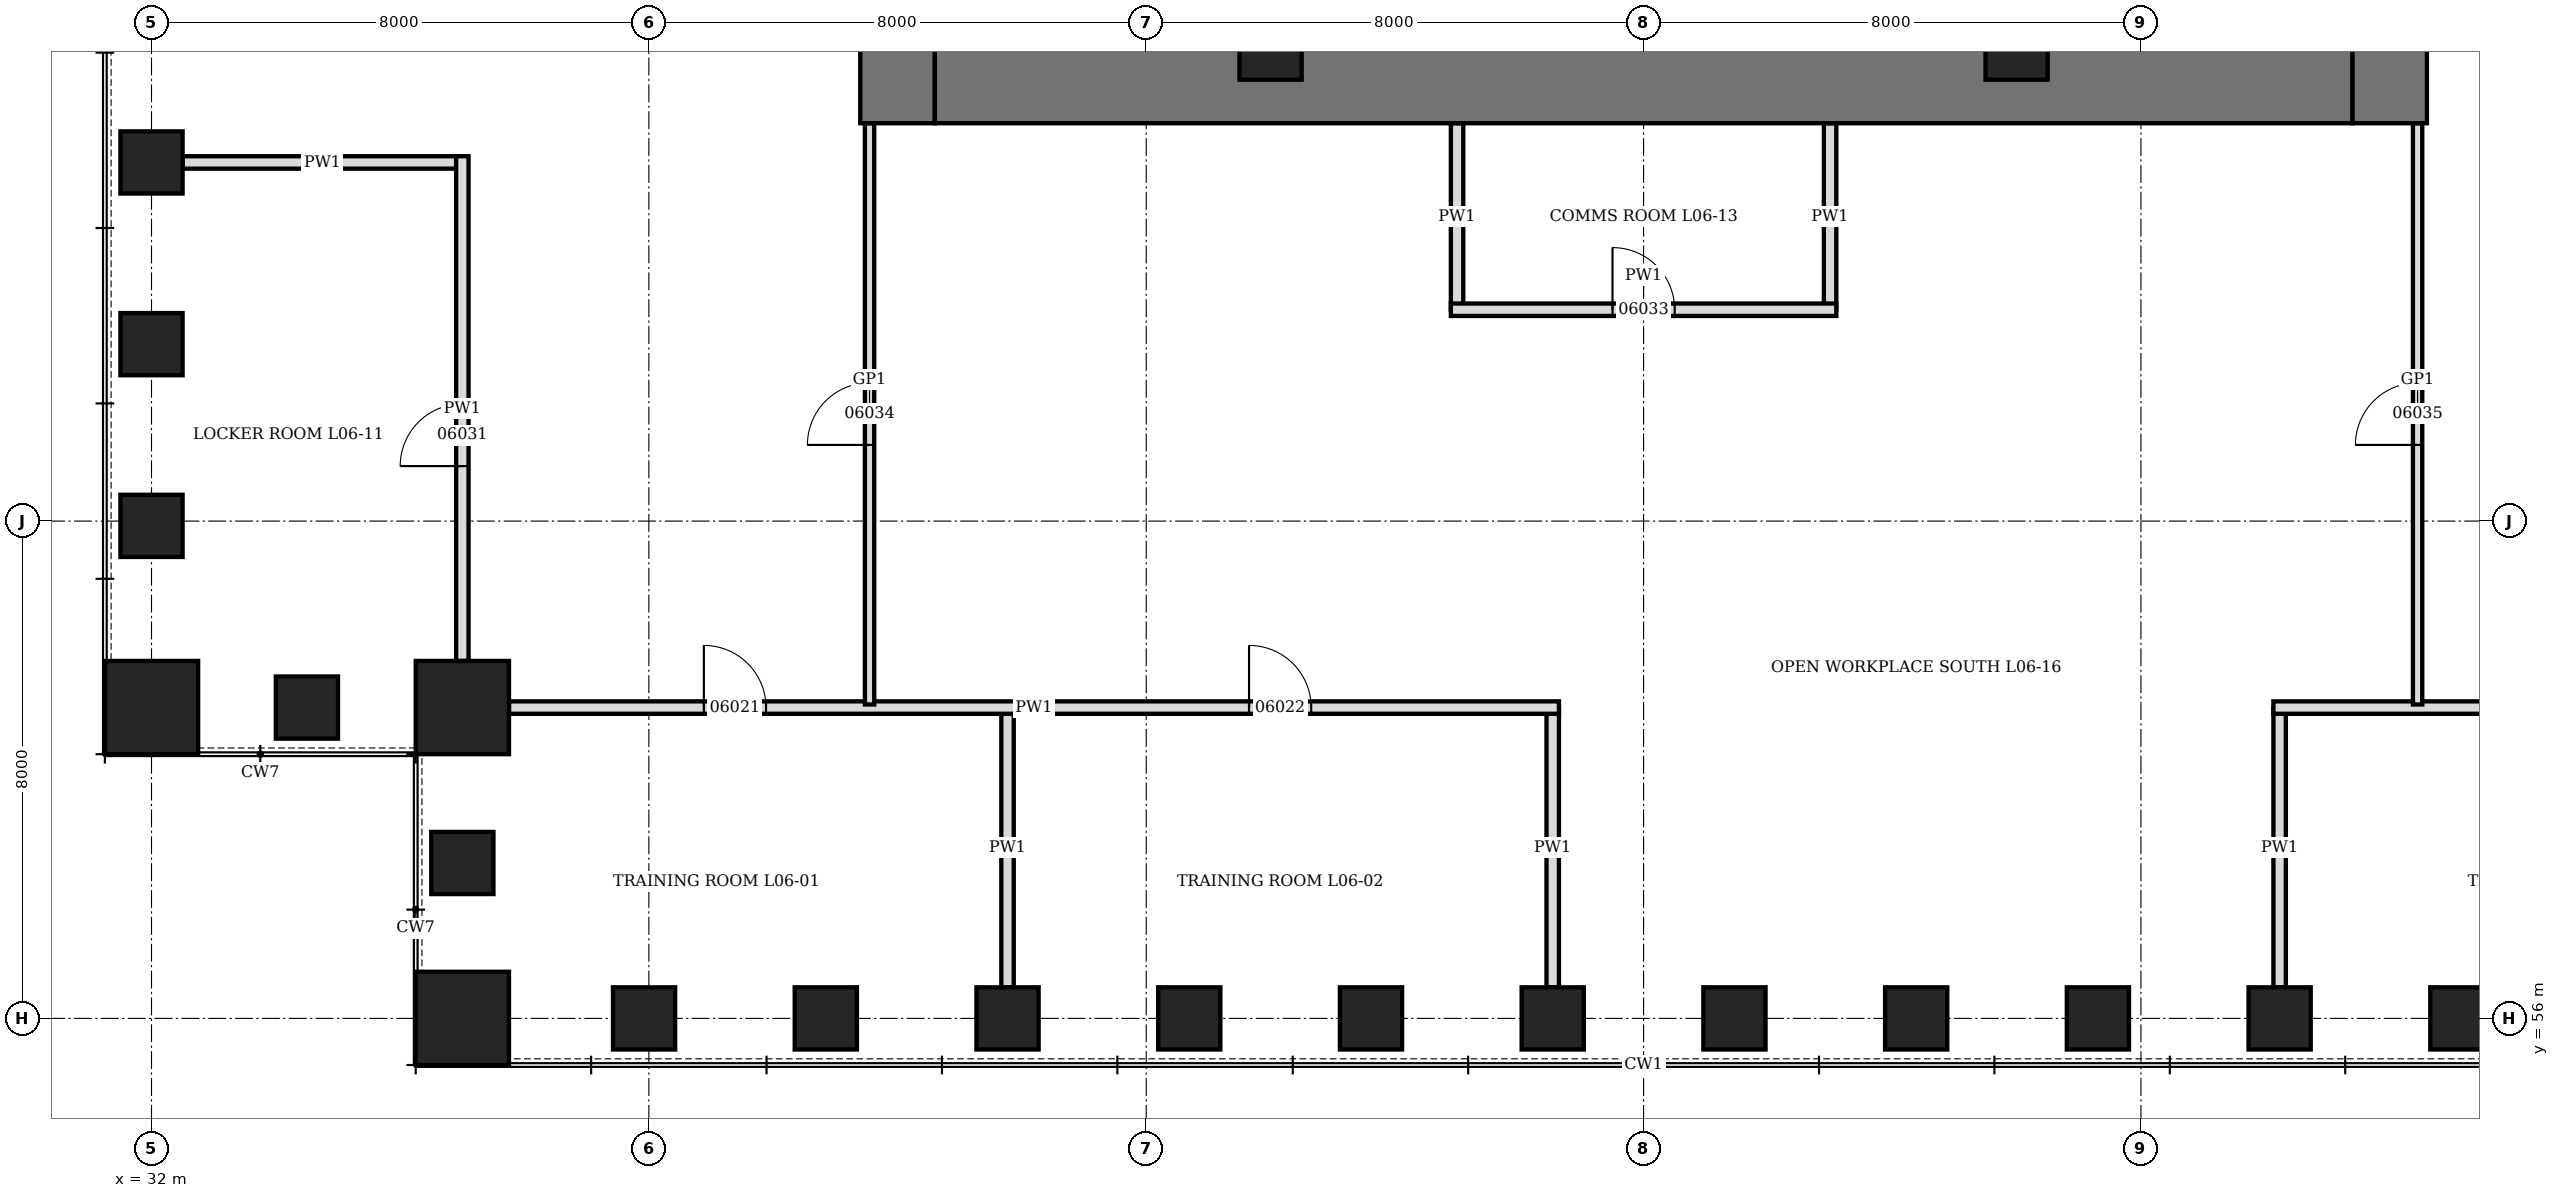
"""IFC4 building model, lengths in metres.
Left out: names, types, materials, properties, quantities, classifications, styles, units other than length and angle.
Written with IfcOpenShell. Run it as: python <this file> out.ifc"""

import sys

from ifc_helpers import new_model, si_unit, direction, frame, frame_2d, origin, origin_2d, place, context, subcontext, project, spatial, rectangle, hollow_rectangle, extrude, element, fill, save


model = new_model("IFC4")
c1 = context("Model", 3, precision=1e-05, world=origin(), true_north=direction((0.0, 1.0)))
c2 = subcontext(c1, "Body", "Model", "MODEL_VIEW")
j1 = project(units=[si_unit("LENGTHUNIT", "METRE"), si_unit("PLANEANGLEUNIT", "RADIAN")], contexts=[c1])
p1 = place(None, origin())
s1 = spatial("IfcSite", under=j1, at=p1, CompositionType="ELEMENT")
p2 = place(p1, origin())
s2 = spatial("IfcBuilding", under=s1, at=p2, CompositionType="ELEMENT")
p3 = place(p2, frame((0.0, 0.0, 34.9)))
s3 = spatial("IfcBuildingStorey", under=s2, at=p3, CompositionType="ELEMENT", Elevation=34.9)
p4 = place(p3, frame((37.0, 56.0, -0.3), z_axis=(0.0, 0.0, 1.0), x_axis=(1.0, 0.0, 0.0)))
e1 = element("IfcColumn", 1, at=p4, inside=s3, PredefinedType="COLUMN", context=c2, shape_type="SweptSolid", body=[
    extrude(hollow_rectangle(XDim=1.5, YDim=1.5, WallThickness=0.6, at=origin_2d()), origin(), (0.0, 0.0, 1.0), 4.5),
])
for number, where, z_axis, x_axis in (
    (2, (39.923, 56.0, -0.3), (0.0, 0.0, 1.0), (1.0, 0.0, 0.0)),
    (3, (42.846, 56.0, -0.3), (0.0, 0.0, 1.0), (1.0, 0.0, 0.0)),
    (4, (45.769, 56.0, -0.3), (0.0, 0.0, 1.0), (1.0, 0.0, 0.0)),
    (5, (48.692, 56.0, -0.3), (0.0, 0.0, 1.0), (1.0, 0.0, 0.0)),
    (6, (51.615, 56.0, -0.3), (0.0, 0.0, 1.0), (1.0, 0.0, 0.0)),
    (7, (54.539, 56.0, -0.3), (0.0, 0.0, 1.0), (1.0, 0.0, 0.0)),
    (8, (57.461, 56.0, -0.3), (0.0, 0.0, 1.0), (1.0, 0.0, 0.0)),
    (9, (60.385, 56.0, -0.3), (0.0, 0.0, 1.0), (1.0, 0.0, 0.0)),
    (10, (63.308, 56.0, -0.3), (0.0, 0.0, 1.0), (1.0, 0.0, 0.0)),
    (11, (66.231, 56.0, -0.3), (0.0, 0.0, 1.0), (1.0, 0.0, 0.0)),
    (12, (69.154, 56.0, -0.3), (0.0, 0.0, 1.0), (1.0, 0.0, 0.0)),
    (13, (32.0, 69.769, -0.3), (0.0, 0.0, 1.0), (0.0, 1.0, 0.0)),
    (14, (32.0, 66.846, -0.3), (0.0, 0.0, 1.0), (0.0, 1.0, 0.0)),
    (15, (32.0, 63.923, -0.3), (0.0, 0.0, 1.0), (0.0, 1.0, 0.0)),
):
    element("IfcColumn", number, at=place(p3, frame(where, z_axis=z_axis, x_axis=x_axis)), inside=s3, PredefinedType="COLUMN", context=c2, shape_type="SweptSolid", body=[
        extrude(hollow_rectangle(XDim=1.0, YDim=1.0, WallThickness=0.25, at=origin_2d()), origin(), (0.0, 0.0, 1.0), 4.5),
    ])
p5 = place(p3, frame((32.0, 61.0, -0.3), z_axis=(0.0, 0.0, 1.0), x_axis=(1.0, 0.0, 0.0)))
e16 = element("IfcColumn", 16, at=p5, inside=s3, PredefinedType="COLUMN", context=c2, shape_type="SweptSolid", body=[
    extrude(hollow_rectangle(XDim=1.5, YDim=1.5, WallThickness=0.6, at=origin_2d()), origin(), (0.0, 0.0, 1.0), 4.5),
])
p6 = place(p3, frame((34.5, 61.0, -0.3), z_axis=(0.0, 0.0, 1.0), x_axis=(1.0, 0.0, 0.0)))
e17 = element("IfcColumn", 17, at=p6, inside=s3, PredefinedType="COLUMN", context=c2, shape_type="SweptSolid", body=[
    extrude(hollow_rectangle(XDim=1.0, YDim=1.0, WallThickness=0.25, at=origin_2d()), origin(), (0.0, 0.0, 1.0), 4.5),
])
p7 = place(p3, frame((37.0, 61.0, -0.3), z_axis=(0.0, 0.0, 1.0), x_axis=(0.0, 1.0, 0.0)))
e18 = element("IfcColumn", 18, at=p7, inside=s3, PredefinedType="COLUMN", context=c2, shape_type="SweptSolid", body=[
    extrude(hollow_rectangle(XDim=1.5, YDim=1.5, WallThickness=0.6, at=origin_2d()), origin(), (0.0, 0.0, 1.0), 4.5),
])
p8 = place(p3, frame((37.0, 58.5, -0.3), z_axis=(0.0, 0.0, 1.0), x_axis=(0.0, 1.0, 0.0)))
e19 = element("IfcColumn", 19, at=p8, inside=s3, PredefinedType="COLUMN", context=c2, shape_type="SweptSolid", body=[
    extrude(hollow_rectangle(XDim=1.0, YDim=1.0, WallThickness=0.25, at=origin_2d()), origin(), (0.0, 0.0, 1.0), 4.5),
])
p9 = place(p3, frame((44.0, 70.4, 0.0), z_axis=(0.0, 0.0, 1.0), x_axis=(0.0, 1.0, 0.0)))
e20 = element("IfcWall", 20, at=p9, inside=s3, PredefinedType="SHEAR", context=c2, shape_type="SweptSolid", body=[
    extrude(rectangle(XDim=19.2, YDim=1.2, at=frame_2d((9.6, 0.0))), origin(), (0.0, 0.0, 1.0), 4.2),
])
p10 = place(p9, frame((8.6, 0.0, 0.0)))
e21 = element("IfcOpeningElement", 21, at=p10, cuts=e20, PredefinedType="OPENING", context=c2, shape_type="SweptSolid", body=[
    extrude(rectangle(XDim=2.0, YDim=2.4, at=frame_2d((1.0, 1.2))), frame((0.0, 0.61, 0.0), z_axis=(0.0, -1.0, 0.0), x_axis=(1.0, 0.0, 0.0)), (0.0, 0.0, 1.0), 1.22),
])
p11 = place(p3, frame((68.0, 70.4, 0.0), z_axis=(0.0, 0.0, 1.0), x_axis=(0.0, 1.0, 0.0)))
e22 = element("IfcWall", 22, at=p11, inside=s3, PredefinedType="SHEAR", context=c2, shape_type="SweptSolid", body=[
    extrude(rectangle(XDim=19.2, YDim=1.2, at=frame_2d((9.6, 0.0))), origin(), (0.0, 0.0, 1.0), 4.2),
])
p12 = place(p11, frame((8.6, 0.0, 0.0)))
e23 = element("IfcOpeningElement", 23, at=p12, cuts=e22, PredefinedType="OPENING", context=c2, shape_type="SweptSolid", body=[
    extrude(rectangle(XDim=2.0, YDim=2.4, at=frame_2d((1.0, 1.2))), frame((0.0, 0.61, 0.0), z_axis=(0.0, -1.0, 0.0), x_axis=(1.0, 0.0, 0.0)), (0.0, 0.0, 1.0), 1.22),
])
p13 = place(p3, frame((44.6, 71.0, 0.0), z_axis=(0.0, 0.0, 1.0), x_axis=(1.0, 0.0, 0.0)))
e24 = element("IfcWall", 24, at=p13, inside=s3, PredefinedType="SHEAR", context=c2, shape_type="SweptSolid", body=[
    extrude(rectangle(XDim=22.8, YDim=1.2, at=frame_2d((11.4, 0.0))), origin(), (0.0, 0.0, 1.0), 4.2),
])
for number, where, z_axis, x_axis in (
    (25, (50.0, 71.6, 0.0), (0.0, 0.0, 1.0), (1.0, 0.0, 0.0)),
    (26, (62.0, 71.6, 0.0), (0.0, 0.0, 1.0), (1.0, 0.0, 0.0)),
):
    element("IfcColumn", number, at=place(p3, frame(where, z_axis=z_axis, x_axis=x_axis)), inside=s3, PredefinedType="COLUMN", context=c2, shape_type="SweptSolid", body=[
        extrude(hollow_rectangle(XDim=1.0, YDim=1.0, WallThickness=0.15, at=origin_2d()), origin(), (0.0, 0.0, 1.0), 4.2),
    ])
for number, where, z_axis, x_axis in (
    (27, (45.769, 56.5, 0.0), (0.0, 0.0, 1.0), (0.0, 1.0, 0.0)),
    (28, (54.539, 56.5, 0.0), (0.0, 0.0, 1.0), (0.0, 1.0, 0.0)),
    (29, (66.231, 56.5, 0.0), (0.0, 0.0, 1.0), (0.0, 1.0, 0.0)),
):
    element("IfcWall", number, at=place(p3, frame(where, z_axis=z_axis, x_axis=x_axis)), inside=s3, PredefinedType="PARTITIONING", context=c2, shape_type="SweptSolid", body=[
        extrude(rectangle(XDim=4.5, YDim=0.2, at=frame_2d((2.25, 0.0))), origin(), (0.0, 0.0, 1.0), 3.278),
    ])
p14 = place(p3, frame((32.5, 69.769, 0.0), z_axis=(0.0, 0.0, 1.0), x_axis=(1.0, 0.0, 0.0)))
e30 = element("IfcWall", 30, at=p14, inside=s3, PredefinedType="PARTITIONING", context=c2, shape_type="SweptSolid", body=[
    extrude(rectangle(XDim=4.5, YDim=0.2, at=frame_2d((2.25, 0.0))), origin(), (0.0, 0.0, 1.0), 3.428),
])
for number, where, z_axis, x_axis in (
    (31, (53.0, 67.4, 0.0), (0.0, 0.0, 1.0), (0.0, 1.0, 0.0)),
    (32, (59.0, 67.4, 0.0), (0.0, 0.0, 1.0), (0.0, 1.0, 0.0)),
):
    element("IfcWall", number, at=place(p3, frame(where, z_axis=z_axis, x_axis=x_axis)), inside=s3, PredefinedType="PARTITIONING", context=c2, shape_type="SweptSolid", body=[
        extrude(rectangle(XDim=3.0, YDim=0.2, at=frame_2d((1.5, 0.0))), origin(), (0.0, 0.0, 1.0), 4.04),
    ])
p15 = place(p3, frame((37.75, 61.0, 0.0), z_axis=(0.0, 0.0, 1.0), x_axis=(1.0, 0.0, 0.0)))
e33 = element("IfcWall", 33, at=p15, inside=s3, PredefinedType="PARTITIONING", context=c2, shape_type="SweptSolid", body=[
    extrude(rectangle(XDim=16.888, YDim=0.2, at=frame_2d((8.444, 0.0))), origin(), (0.0, 0.0, 1.0), 4.04),
])
p16 = place(p15, frame((3.135, 0.0, 0.0)))
e34 = element("IfcOpeningElement", 34, at=p16, cuts=e33, PredefinedType="OPENING", context=c2, shape_type="SweptSolid", body=[
    extrude(rectangle(XDim=1.0, YDim=2.1, at=frame_2d((0.5, 1.05))), frame((0.0, 0.11, 0.0), z_axis=(0.0, -1.0, 0.0), x_axis=(1.0, 0.0, 0.0)), (0.0, 0.0, 1.0), 0.22),
])
p17 = place(p15, frame((11.904, 0.0, 0.0)))
e35 = element("IfcOpeningElement", 35, at=p17, cuts=e33, PredefinedType="OPENING", context=c2, shape_type="SweptSolid", body=[
    extrude(rectangle(XDim=1.0, YDim=2.1, at=frame_2d((0.5, 1.05))), frame((0.0, 0.11, 0.0), z_axis=(0.0, -1.0, 0.0), x_axis=(1.0, 0.0, 0.0)), (0.0, 0.0, 1.0), 0.22),
])
p18 = place(p3, frame((66.131, 61.0, 0.0), z_axis=(0.0, 0.0, 1.0), x_axis=(1.0, 0.0, 0.0)))
e36 = element("IfcWall", 36, at=p18, inside=s3, PredefinedType="PARTITIONING", context=c2, shape_type="SweptSolid", body=[
    extrude(rectangle(XDim=8.119, YDim=0.2, at=frame_2d((4.06, 0.0))), origin(), (0.0, 0.0, 1.0), 4.04),
])
p19 = place(p18, frame((3.985, 0.0, 0.0)))
e37 = element("IfcOpeningElement", 37, at=p19, cuts=e36, PredefinedType="OPENING", context=c2, shape_type="SweptSolid", body=[
    extrude(rectangle(XDim=1.0, YDim=2.1, at=frame_2d((0.5, 1.05))), frame((0.0, 0.11, 0.0), z_axis=(0.0, -1.0, 0.0), x_axis=(1.0, 0.0, 0.0)), (0.0, 0.0, 1.0), 0.22),
])
p20 = place(p3, frame((52.9, 67.4, 0.0), z_axis=(0.0, 0.0, 1.0), x_axis=(1.0, 0.0, 0.0)))
e38 = element("IfcWall", 38, at=p20, inside=s3, PredefinedType="PARTITIONING", context=c2, shape_type="SweptSolid", body=[
    extrude(rectangle(XDim=6.2, YDim=0.2, at=frame_2d((3.1, 0.0))), origin(), (0.0, 0.0, 1.0), 4.04),
])
p21 = place(p20, frame((2.6, 0.0, 0.0)))
e39 = element("IfcOpeningElement", 39, at=p21, cuts=e38, PredefinedType="OPENING", context=c2, shape_type="SweptSolid", body=[
    extrude(rectangle(XDim=1.0, YDim=2.1, at=frame_2d((0.5, 1.05))), frame((0.0, 0.11, 0.0), z_axis=(0.0, -1.0, 0.0), x_axis=(1.0, 0.0, 0.0)), (0.0, 0.0, 1.0), 0.22),
])
p22 = place(p3, frame((37.0, 61.75, 0.0), z_axis=(0.0, 0.0, 1.0), x_axis=(0.0, 1.0, 0.0)))
e40 = element("IfcWall", 40, at=p22, inside=s3, PredefinedType="PARTITIONING", context=c2, shape_type="SweptSolid", body=[
    extrude(rectangle(XDim=8.119, YDim=0.2, at=frame_2d((4.06, 0.0))), origin(), (0.0, 0.0, 1.0), 4.04),
])
p23 = place(p22, frame((3.135, 0.0, 0.0)))
e41 = element("IfcOpeningElement", 41, at=p23, cuts=e40, PredefinedType="OPENING", context=c2, shape_type="SweptSolid", body=[
    extrude(rectangle(XDim=1.0, YDim=2.1, at=frame_2d((0.5, 1.05))), frame((0.0, 0.11, 0.0), z_axis=(0.0, -1.0, 0.0), x_axis=(1.0, 0.0, 0.0)), (0.0, 0.0, 1.0), 0.22),
])
p24 = place(p3, frame((43.55, 61.05, 0.0), z_axis=(0.0, 0.0, 1.0), x_axis=(0.0, 1.0, 0.0)))
e42 = element("IfcWall", 42, at=p24, inside=s3, PredefinedType="PARTITIONING", context=c2, shape_type="SweptSolid", body=[
    extrude(rectangle(XDim=9.35, YDim=0.15, at=frame_2d((4.675, 0.0))), origin(), (0.0, 0.0, 1.0), 4.04),
])
p25 = place(p24, frame((4.175, 0.0, 0.0)))
e43 = element("IfcOpeningElement", 43, at=p25, cuts=e42, PredefinedType="OPENING", context=c2, shape_type="SweptSolid", body=[
    extrude(rectangle(XDim=1.0, YDim=2.4, at=frame_2d((0.5, 1.2))), frame((0.0, 0.085, 0.0), z_axis=(0.0, -1.0, 0.0), x_axis=(1.0, 0.0, 0.0)), (0.0, 0.0, 1.0), 0.17),
])
p26 = place(p3, frame((68.45, 61.05, 0.0), z_axis=(0.0, 0.0, 1.0), x_axis=(0.0, 1.0, 0.0)))
e44 = element("IfcWall", 44, at=p26, inside=s3, PredefinedType="PARTITIONING", context=c2, shape_type="SweptSolid", body=[
    extrude(rectangle(XDim=9.35, YDim=0.15, at=frame_2d((4.675, 0.0))), origin(), (0.0, 0.0, 1.0), 4.04),
])
p27 = place(p26, frame((4.175, 0.0, 0.0)))
e45 = element("IfcOpeningElement", 45, at=p27, cuts=e44, PredefinedType="OPENING", context=c2, shape_type="SweptSolid", body=[
    extrude(rectangle(XDim=1.0, YDim=2.4, at=frame_2d((0.5, 1.2))), frame((0.0, 0.085, 0.0), z_axis=(0.0, -1.0, 0.0), x_axis=(1.0, 0.0, 0.0)), (0.0, 0.0, 1.0), 0.17),
])
p28 = place(p16, origin())
e46 = element("IfcDoor", 46, at=p28, inside=s3, OperationType="SINGLE_SWING_LEFT", PredefinedType="DOOR", context=c2, shape_type="SweptSolid", body=[
    extrude(rectangle(XDim=1.0, YDim=2.1, at=frame_2d((0.5, 1.05))), frame((0.0, 0.1, 0.0), z_axis=(0.0, -1.0, 0.0), x_axis=(1.0, 0.0, 0.0)), (0.0, 0.0, 1.0), 0.199),
])
fill(e34, e46)
p29 = place(p17, origin())
e47 = element("IfcDoor", 47, at=p29, inside=s3, OperationType="SINGLE_SWING_LEFT", PredefinedType="DOOR", context=c2, shape_type="SweptSolid", body=[
    extrude(rectangle(XDim=1.0, YDim=2.1, at=frame_2d((0.5, 1.05))), frame((0.0, 0.1, 0.0), z_axis=(0.0, -1.0, 0.0), x_axis=(1.0, 0.0, 0.0)), (0.0, 0.0, 1.0), 0.199),
])
fill(e35, e47)
p30 = place(p23, origin())
e48 = element("IfcDoor", 48, at=p30, inside=s3, OperationType="SINGLE_SWING_LEFT", PredefinedType="DOOR", context=c2, shape_type="SweptSolid", body=[
    extrude(rectangle(XDim=1.0, YDim=2.1, at=frame_2d((0.5, 1.05))), frame((0.0, 0.1, 0.0), z_axis=(0.0, -1.0, 0.0), x_axis=(1.0, 0.0, 0.0)), (0.0, 0.0, 1.0), 0.199),
])
fill(e41, e48)
p31 = place(p21, origin())
e49 = element("IfcDoor", 49, at=p31, inside=s3, OperationType="SINGLE_SWING_LEFT", PredefinedType="DOOR", context=c2, shape_type="SweptSolid", body=[
    extrude(rectangle(XDim=1.0, YDim=2.1, at=frame_2d((0.5, 1.05))), frame((0.0, 0.1, 0.0), z_axis=(0.0, -1.0, 0.0), x_axis=(1.0, 0.0, 0.0)), (0.0, 0.0, 1.0), 0.199),
])
fill(e39, e49)
p32 = place(p25, origin())
e50 = element("IfcDoor", 50, at=p32, inside=s3, OperationType="SINGLE_SWING_RIGHT", PredefinedType="DOOR", context=c2, shape_type="SweptSolid", body=[
    extrude(rectangle(XDim=1.0, YDim=2.4, at=frame_2d((0.5, 1.2))), frame((0.0, 0.075, 0.0), z_axis=(0.0, -1.0, 0.0), x_axis=(1.0, 0.0, 0.0)), (0.0, 0.0, 1.0), 0.149),
])
fill(e43, e50)
p33 = place(p27, origin())
e51 = element("IfcDoor", 51, at=p33, inside=s3, OperationType="SINGLE_SWING_RIGHT", PredefinedType="DOOR", context=c2, shape_type="SweptSolid", body=[
    extrude(rectangle(XDim=1.0, YDim=2.4, at=frame_2d((0.5, 1.2))), frame((0.0, 0.075, 0.0), z_axis=(0.0, -1.0, 0.0), x_axis=(1.0, 0.0, 0.0)), (0.0, 0.0, 1.0), 0.149),
])
fill(e45, e51)
save(model, sys.argv[1])
